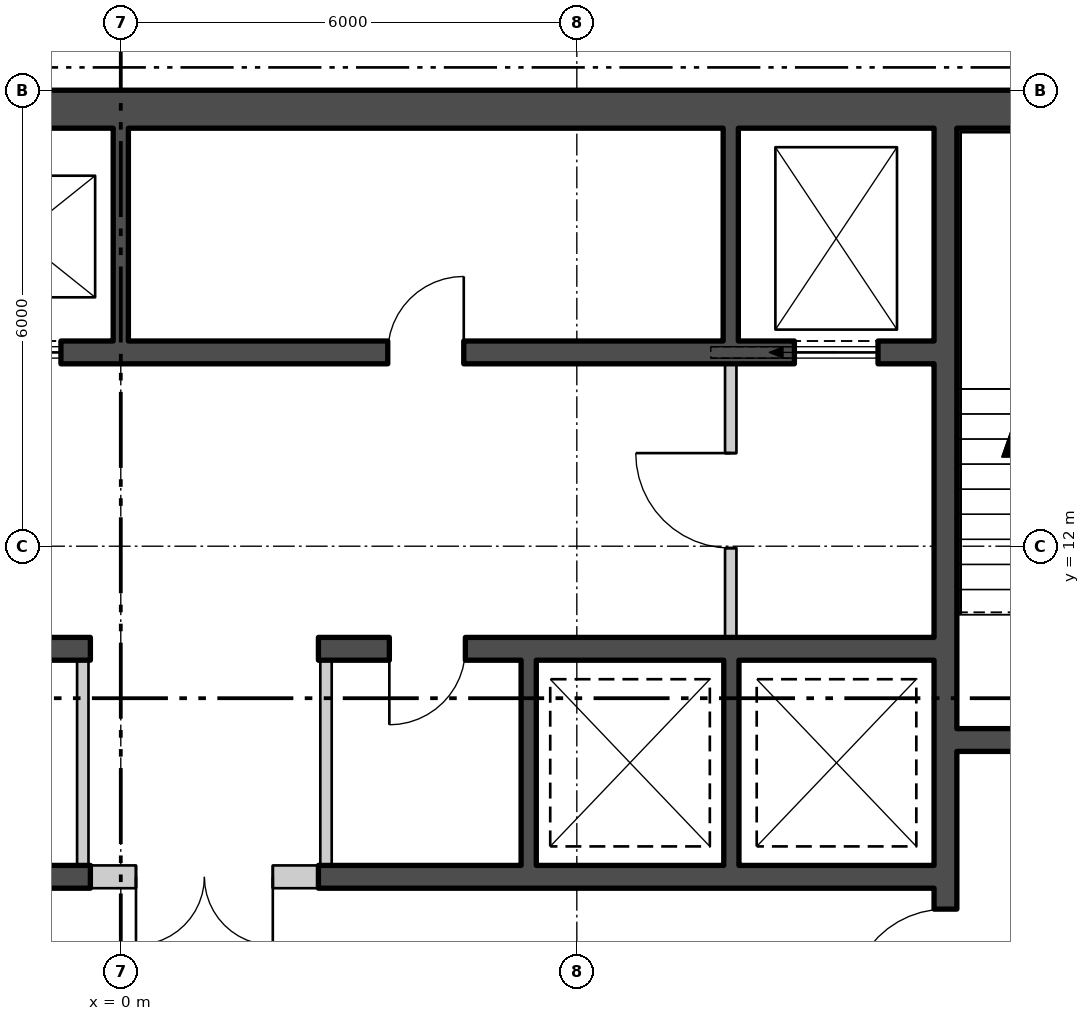
"""IFC4 building model, lengths in metres.
Left out: names, types, materials, properties, quantities, classifications, styles, units other than length and angle.
Written with IfcOpenShell. Run it as: python <this file> out.ifc"""

import sys

from ifc_helpers import new_model, si_unit, direction, frame, frame_2d, origin, place, context, subcontext, project, spatial, polyline, rectangle, outline, extrude, element, fill, save


model = new_model("IFC4")
c1 = context("Model", 3, precision=1e-05, world=origin(), true_north=direction((0.0, 1.0)))
c2 = subcontext(c1, "Body", "Model", "MODEL_VIEW")
j1 = project(units=[si_unit("LENGTHUNIT", "METRE"), si_unit("PLANEANGLEUNIT", "RADIAN")], contexts=[c1])
p1 = place(None, origin())
s1 = spatial("IfcSite", under=j1, at=p1, CompositionType="ELEMENT")
p2 = place(p1, origin())
s2 = spatial("IfcBuilding", under=s1, at=p2, CompositionType="ELEMENT")
p3 = place(p2, frame((0.0, 0.0, 186.6)))
s3 = spatial("IfcBuildingStorey", under=s2, at=p3, CompositionType="ELEMENT", Elevation=186.6)
p4 = place(p3, frame((3.8, -26.219, -0.18), z_axis=(0.0, 0.0, 1.0), x_axis=(0.500000711659, 0.866024992908, 0.0)))
e1 = element("IfcWall", 1, at=p4, inside=s3, PredefinedType="SOLIDWALL", context=c2, shape_type="SweptSolid", body=[
    extrude(outline(polyline([(-0.13, -0.225), (45.87, -0.225), (45.61, 0.225), (0.13, 0.225), (-0.13, -0.225)])), origin(), (0.0, 0.0, 1.0), 6.0),
])
p5 = place(p4, frame((1.424, 0.0, 1.38)))
e2 = element("IfcOpeningElement", 2, at=p5, cuts=e1, PredefinedType="OPENING", context=c2, shape_type="SweptSolid", body=[
    extrude(rectangle(XDim=2.4, YDim=3.6, at=frame_2d((1.2, 1.8))), frame((0.0, 0.235, 0.0), z_axis=(0.0, -1.0, 0.0), x_axis=(1.0, 0.0, 0.0)), (0.0, 0.0, 1.0), 0.47),
])
p6 = place(p4, frame((5.893, 0.0, 1.38)))
e3 = element("IfcOpeningElement", 3, at=p6, cuts=e1, PredefinedType="OPENING", context=c2, shape_type="SweptSolid", body=[
    extrude(rectangle(XDim=2.4, YDim=3.6, at=frame_2d((1.2, 1.8))), frame((0.0, 0.235, 0.0), z_axis=(0.0, -1.0, 0.0), x_axis=(1.0, 0.0, 0.0)), (0.0, 0.0, 1.0), 0.47),
])
p7 = place(p4, frame((10.401, 0.0, 1.38)))
e4 = element("IfcOpeningElement", 4, at=p7, cuts=e1, PredefinedType="OPENING", context=c2, shape_type="SweptSolid", body=[
    extrude(rectangle(XDim=2.4, YDim=3.6, at=frame_2d((1.2, 1.8))), frame((0.0, 0.235, 0.0), z_axis=(0.0, -1.0, 0.0), x_axis=(1.0, 0.0, 0.0)), (0.0, 0.0, 1.0), 0.47),
])
p8 = place(p4, frame((14.909, 0.0, 1.38)))
e5 = element("IfcOpeningElement", 5, at=p8, cuts=e1, PredefinedType="OPENING", context=c2, shape_type="SweptSolid", body=[
    extrude(rectangle(XDim=2.4, YDim=3.6, at=frame_2d((1.2, 1.8))), frame((0.0, 0.235, 0.0), z_axis=(0.0, -1.0, 0.0), x_axis=(1.0, 0.0, 0.0)), (0.0, 0.0, 1.0), 0.47),
])
p9 = place(p4, frame((19.416, 0.0, 1.38)))
e6 = element("IfcOpeningElement", 6, at=p9, cuts=e1, PredefinedType="OPENING", context=c2, shape_type="SweptSolid", body=[
    extrude(rectangle(XDim=2.4, YDim=3.6, at=frame_2d((1.2, 1.8))), frame((0.0, 0.235, 0.0), z_axis=(0.0, -1.0, 0.0), x_axis=(1.0, 0.0, 0.0)), (0.0, 0.0, 1.0), 0.47),
])
p10 = place(p4, frame((23.924, 0.0, 1.38)))
e7 = element("IfcOpeningElement", 7, at=p10, cuts=e1, PredefinedType="OPENING", context=c2, shape_type="SweptSolid", body=[
    extrude(rectangle(XDim=2.4, YDim=3.6, at=frame_2d((1.2, 1.8))), frame((0.0, 0.235, 0.0), z_axis=(0.0, -1.0, 0.0), x_axis=(1.0, 0.0, 0.0)), (0.0, 0.0, 1.0), 0.47),
])
p11 = place(p4, frame((28.431, 0.0, 1.38)))
e8 = element("IfcOpeningElement", 8, at=p11, cuts=e1, PredefinedType="OPENING", context=c2, shape_type="SweptSolid", body=[
    extrude(rectangle(XDim=2.4, YDim=3.6, at=frame_2d((1.2, 1.8))), frame((0.0, 0.235, 0.0), z_axis=(0.0, -1.0, 0.0), x_axis=(1.0, 0.0, 0.0)), (0.0, 0.0, 1.0), 0.47),
])
p12 = place(p4, frame((32.939, 0.0, 1.38)))
e9 = element("IfcOpeningElement", 9, at=p12, cuts=e1, PredefinedType="OPENING", context=c2, shape_type="SweptSolid", body=[
    extrude(rectangle(XDim=2.4, YDim=3.6, at=frame_2d((1.2, 1.8))), frame((0.0, 0.235, 0.0), z_axis=(0.0, -1.0, 0.0), x_axis=(1.0, 0.0, 0.0)), (0.0, 0.0, 1.0), 0.47),
])
p13 = place(p4, frame((37.447, 0.0, 1.38)))
e10 = element("IfcOpeningElement", 10, at=p13, cuts=e1, PredefinedType="OPENING", context=c2, shape_type="SweptSolid", body=[
    extrude(rectangle(XDim=2.4, YDim=3.6, at=frame_2d((1.2, 1.8))), frame((0.0, 0.235, 0.0), z_axis=(0.0, -1.0, 0.0), x_axis=(1.0, 0.0, 0.0)), (0.0, 0.0, 1.0), 0.47),
])
p14 = place(p4, frame((41.916, 0.0, 1.38)))
e11 = element("IfcOpeningElement", 11, at=p14, cuts=e1, PredefinedType="OPENING", context=c2, shape_type="SweptSolid", body=[
    extrude(rectangle(XDim=2.4, YDim=3.6, at=frame_2d((1.2, 1.8))), frame((0.0, 0.235, 0.0), z_axis=(0.0, -1.0, 0.0), x_axis=(1.0, 0.0, 0.0)), (0.0, 0.0, 1.0), 0.47),
])
p15 = place(p3, frame((-16.2, 17.75, 0.0), z_axis=(0.0, 0.0, 1.0), x_axis=(1.0, 0.0, 0.0)))
e12 = element("IfcWall", 12, at=p15, inside=s3, PredefinedType="SHEAR", context=c2, shape_type="SweptSolid", body=[
    extrude(rectangle(XDim=32.4, YDim=0.5, at=frame_2d((16.2, 0.0))), origin(), (0.0, 0.0, 1.0), 5.8),
])
p16 = place(p3, frame((10.85, 2.5, 0.0), z_axis=(0.0, 0.0, 1.0), x_axis=(0.0, 1.0, 0.0)))
e13 = element("IfcWall", 13, at=p16, inside=s3, PredefinedType="SHEAR", context=c2, shape_type="SweptSolid", body=[
    extrude(rectangle(XDim=15.0, YDim=0.3, at=frame_2d((7.5, 0.0))), origin(), (0.0, 0.0, 1.0), 5.8),
])
p17 = place(p16, frame((3.475, 0.0, 0.0)))
e14 = element("IfcOpeningElement", 14, at=p17, cuts=e13, PredefinedType="OPENING", context=c2, shape_type="SweptSolid", body=[
    extrude(rectangle(XDim=1.25, YDim=2.1, at=frame_2d((0.625, 1.05))), frame((0.0, 0.16, 0.0), z_axis=(0.0, -1.0, 0.0), x_axis=(1.0, 0.0, 0.0)), (0.0, 0.0, 1.0), 0.32),
])
p18 = place(p16, frame((1.125, 0.0, 0.0)))
e15 = element("IfcOpeningElement", 15, at=p18, cuts=e13, PredefinedType="OPENING", context=c2, shape_type="SweptSolid", body=[
    extrude(rectangle(XDim=1.0, YDim=2.1, at=frame_2d((0.5, 1.05))), frame((0.0, 0.16, 0.0), z_axis=(0.0, -1.0, 0.0), x_axis=(1.0, 0.0, 0.0)), (0.0, 0.0, 1.0), 0.32),
])
p19 = place(p3, frame((11.0, 9.45, 0.0), z_axis=(0.0, 0.0, 1.0), x_axis=(1.0, 0.0, 0.0)))
e16 = element("IfcWall", 16, at=p19, inside=s3, PredefinedType="SHEAR", context=c2, shape_type="SweptSolid", body=[
    extrude(rectangle(XDim=3.2, YDim=0.3, at=frame_2d((1.6, 0.0))), origin(), (0.0, 0.0, 1.0), 5.8),
])
p20 = place(p19, frame((1.0, 0.0, 0.0)))
e17 = element("IfcOpeningElement", 17, at=p20, cuts=e16, PredefinedType="OPENING", context=c2, shape_type="SweptSolid", body=[
    extrude(rectangle(XDim=1.2, YDim=2.1, at=frame_2d((0.6, 1.05))), frame((0.0, 0.16, 0.0), z_axis=(0.0, -1.0, 0.0), x_axis=(1.0, 0.0, 0.0)), (0.0, 0.0, 1.0), 0.32),
])
p21 = place(p3, frame((-10.7, 14.55, 0.0), z_axis=(0.0, 0.0, 1.0), x_axis=(1.0, 0.0, 0.0)))
e18 = element("IfcWall", 18, at=p21, inside=s3, PredefinedType="SHEAR", context=c2, shape_type="SweptSolid", body=[
    extrude(rectangle(XDim=21.4, YDim=0.3, at=frame_2d((10.7, 0.0))), origin(), (0.0, 0.0, 1.0), 5.8),
])
p22 = place(p21, frame((0.738, 0.0, 0.0)))
e19 = element("IfcOpeningElement", 19, at=p22, cuts=e18, PredefinedType="OPENING", context=c2, shape_type="SweptSolid", body=[
    extrude(rectangle(XDim=1.1, YDim=2.1, at=frame_2d((0.55, 1.05))), frame((0.0, 0.16, 0.0), z_axis=(0.0, -1.0, 0.0), x_axis=(1.0, 0.0, 0.0)), (0.0, 0.0, 1.0), 0.32),
])
p23 = place(p21, frame((3.462, 0.0, 0.0)))
e20 = element("IfcOpeningElement", 20, at=p23, cuts=e18, PredefinedType="OPENING", context=c2, shape_type="SweptSolid", body=[
    extrude(rectangle(XDim=1.1, YDim=2.1, at=frame_2d((0.55, 1.05))), frame((0.0, 0.16, 0.0), z_axis=(0.0, -1.0, 0.0), x_axis=(1.0, 0.0, 0.0)), (0.0, 0.0, 1.0), 0.32),
])
p24 = place(p21, frame((6.138, 0.0, 0.0)))
e21 = element("IfcOpeningElement", 21, at=p24, cuts=e18, PredefinedType="OPENING", context=c2, shape_type="SweptSolid", body=[
    extrude(rectangle(XDim=1.1, YDim=2.1, at=frame_2d((0.55, 1.05))), frame((0.0, 0.16, 0.0), z_axis=(0.0, -1.0, 0.0), x_axis=(1.0, 0.0, 0.0)), (0.0, 0.0, 1.0), 0.32),
])
p25 = place(p21, frame((8.812, 0.0, 0.0)))
e22 = element("IfcOpeningElement", 22, at=p25, cuts=e18, PredefinedType="OPENING", context=c2, shape_type="SweptSolid", body=[
    extrude(rectangle(XDim=1.1, YDim=2.1, at=frame_2d((0.55, 1.05))), frame((0.0, 0.16, 0.0), z_axis=(0.0, -1.0, 0.0), x_axis=(1.0, 0.0, 0.0)), (0.0, 0.0, 1.0), 0.32),
])
p26 = place(p21, frame((19.562, 0.0, 0.0)))
e23 = element("IfcOpeningElement", 23, at=p26, cuts=e18, PredefinedType="OPENING", context=c2, shape_type="SweptSolid", body=[
    extrude(rectangle(XDim=1.1, YDim=2.1, at=frame_2d((0.55, 1.05))), frame((0.0, 0.16, 0.0), z_axis=(0.0, -1.0, 0.0), x_axis=(1.0, 0.0, 0.0)), (0.0, 0.0, 1.0), 0.32),
])
p27 = place(p21, frame((14.213, 0.0, 0.0)))
e24 = element("IfcOpeningElement", 24, at=p27, cuts=e18, PredefinedType="OPENING", context=c2, shape_type="SweptSolid", body=[
    extrude(rectangle(XDim=1.0, YDim=2.1, at=frame_2d((0.5, 1.05))), frame((0.0, 0.16, 0.0), z_axis=(0.0, -1.0, 0.0), x_axis=(1.0, 0.0, 0.0)), (0.0, 0.0, 1.0), 0.32),
])
p28 = place(p3, frame((-10.7, 10.65, 0.0), z_axis=(0.0, 0.0, 1.0), x_axis=(1.0, 0.0, 0.0)))
e25 = element("IfcWall", 25, at=p28, inside=s3, PredefinedType="SHEAR", context=c2, shape_type="SweptSolid", body=[
    extrude(rectangle(XDim=10.3, YDim=0.3, at=frame_2d((5.15, 0.0))), origin(), (0.0, 0.0, 1.0), 5.8),
])
p29 = place(p28, frame((0.675, 0.0, 0.0)))
e26 = element("IfcOpeningElement", 26, at=p29, cuts=e25, PredefinedType="OPENING", context=c2, shape_type="SweptSolid", body=[
    extrude(rectangle(XDim=1.1, YDim=2.1, at=frame_2d((0.55, 1.05))), frame((0.0, 0.16, 0.0), z_axis=(0.0, -1.0, 0.0), x_axis=(1.0, 0.0, 0.0)), (0.0, 0.0, 1.0), 0.32),
])
p30 = place(p28, frame((3.275, 0.0, 0.0)))
e27 = element("IfcOpeningElement", 27, at=p30, cuts=e25, PredefinedType="OPENING", context=c2, shape_type="SweptSolid", body=[
    extrude(rectangle(XDim=1.1, YDim=2.1, at=frame_2d((0.55, 1.05))), frame((0.0, 0.16, 0.0), z_axis=(0.0, -1.0, 0.0), x_axis=(1.0, 0.0, 0.0)), (0.0, 0.0, 1.0), 0.32),
])
p31 = place(p28, frame((5.825, 0.0, 0.0)))
e28 = element("IfcOpeningElement", 28, at=p31, cuts=e25, PredefinedType="OPENING", context=c2, shape_type="SweptSolid", body=[
    extrude(rectangle(XDim=1.1, YDim=2.1, at=frame_2d((0.55, 1.05))), frame((0.0, 0.16, 0.0), z_axis=(0.0, -1.0, 0.0), x_axis=(1.0, 0.0, 0.0)), (0.0, 0.0, 1.0), 0.32),
])
p32 = place(p28, frame((8.425, 0.0, 0.0)))
e29 = element("IfcOpeningElement", 29, at=p32, cuts=e25, PredefinedType="OPENING", context=c2, shape_type="SweptSolid", body=[
    extrude(rectangle(XDim=1.0, YDim=2.1, at=frame_2d((0.5, 1.05))), frame((0.0, 0.16, 0.0), z_axis=(0.0, -1.0, 0.0), x_axis=(1.0, 0.0, 0.0)), (0.0, 0.0, 1.0), 0.32),
])
p33 = place(p3, frame((-10.7, 7.65, 0.0), z_axis=(0.0, 0.0, 1.0), x_axis=(1.0, 0.0, 0.0)))
e30 = element("IfcWall", 30, at=p33, inside=s3, PredefinedType="SHEAR", context=c2, shape_type="SweptSolid", body=[
    extrude(rectangle(XDim=10.3, YDim=0.3, at=frame_2d((5.15, 0.0))), origin(), (0.0, 0.0, 1.0), 5.8),
])
p34 = place(p3, frame((2.6, 10.65, 0.0), z_axis=(0.0, 0.0, 1.0), x_axis=(1.0, 0.0, 0.0)))
e31 = element("IfcWall", 31, at=p34, inside=s3, PredefinedType="SHEAR", context=c2, shape_type="SweptSolid", body=[
    extrude(rectangle(XDim=8.1, YDim=0.3, at=frame_2d((4.05, 0.0))), origin(), (0.0, 0.0, 1.0), 5.8),
])
p35 = place(p34, frame((0.933, 0.0, 0.0)))
e32 = element("IfcOpeningElement", 32, at=p35, cuts=e31, PredefinedType="OPENING", context=c2, shape_type="SweptSolid", body=[
    extrude(rectangle(XDim=1.0, YDim=2.1, at=frame_2d((0.5, 1.05))), frame((0.0, 0.16, 0.0), z_axis=(0.0, -1.0, 0.0), x_axis=(1.0, 0.0, 0.0)), (0.0, 0.0, 1.0), 0.32),
])
p36 = place(p3, frame((2.6, 7.65, 0.0), z_axis=(0.0, 0.0, 1.0), x_axis=(1.0, 0.0, 0.0)))
e33 = element("IfcWall", 33, at=p36, inside=s3, PredefinedType="SHEAR", context=c2, shape_type="SweptSolid", body=[
    extrude(rectangle(XDim=8.1, YDim=0.3, at=frame_2d((4.05, 0.0))), origin(), (0.0, 0.0, 1.0), 5.8),
])
for number, where, z_axis, x_axis in (
    (34, (0.0, 14.7, 0.0), (0.0, 0.0, 1.0), (0.0, 1.0, 0.0)),
    (35, (8.025, 14.7, 0.0), (0.0, 0.0, 1.0), (0.0, 1.0, 0.0)),
):
    element("IfcWall", number, at=place(p3, frame(where, z_axis=z_axis, x_axis=x_axis)), inside=s3, PredefinedType="SHEAR", context=c2, shape_type="SweptSolid", body=[
        extrude(rectangle(XDim=2.8, YDim=0.2, at=frame_2d((1.4, 0.0))), origin(), (0.0, 0.0, 1.0), 5.8),
    ])
for number, where, z_axis, x_axis in (
    (36, (-0.5, 7.8, 0.0), (0.0, 0.0, 1.0), (0.0, 1.0, 0.0)),
    (37, (2.7, 7.8, 0.0), (0.0, 0.0, 1.0), (0.0, 1.0, 0.0)),
):
    element("IfcWall", number, at=place(p3, frame(where, z_axis=z_axis, x_axis=x_axis)), inside=s3, PredefinedType="PARTITIONING", context=c2, shape_type="SweptSolid", body=[
        extrude(rectangle(XDim=2.7, YDim=0.15, at=frame_2d((1.35, 0.0))), origin(), (0.0, 0.0, 1.0), 5.8),
    ])
for number, where, z_axis, x_axis in (
    (38, (5.367, 7.8, 0.0), (0.0, 0.0, 1.0), (0.0, 1.0, 0.0)),
    (39, (8.033, 7.8, 0.0), (0.0, 0.0, 1.0), (0.0, 1.0, 0.0)),
):
    element("IfcWall", number, at=place(p3, frame(where, z_axis=z_axis, x_axis=x_axis)), inside=s3, PredefinedType="SHEAR", context=c2, shape_type="SweptSolid", body=[
        extrude(rectangle(XDim=2.7, YDim=0.2, at=frame_2d((1.35, 0.0))), origin(), (0.0, 0.0, 1.0), 5.8),
    ])
p37 = place(p3, frame((8.025, 10.8, 0.0), z_axis=(0.0, 0.0, 1.0), x_axis=(0.0, 1.0, 0.0)))
e40 = element("IfcWall", 40, at=p37, inside=s3, PredefinedType="PARTITIONING", context=c2, shape_type="SweptSolid", body=[
    extrude(rectangle(XDim=3.6, YDim=0.15, at=frame_2d((1.8, 0.0))), origin(), (0.0, 0.0, 1.0), 5.8),
])
p38 = place(p37, frame((1.175, 0.0, 0.0)))
e41 = element("IfcOpeningElement", 41, at=p38, cuts=e40, PredefinedType="OPENING", context=c2, shape_type="SweptSolid", body=[
    extrude(rectangle(XDim=1.25, YDim=2.1, at=frame_2d((0.625, 1.05))), frame((0.0, 0.085, 0.0), z_axis=(0.0, -1.0, 0.0), x_axis=(1.0, 0.0, 0.0)), (0.0, 0.0, 1.0), 0.17),
])
p39 = place(p3, frame((-0.4, 7.65, 0.0), z_axis=(0.0, 0.0, 1.0), x_axis=(1.0, 0.0, 0.0)))
e42 = element("IfcWall", 42, at=p39, inside=s3, PredefinedType="PARTITIONING", context=c2, shape_type="SweptSolid", body=[
    extrude(rectangle(XDim=3.0, YDim=0.3, at=frame_2d((1.5, 0.0))), origin(), (0.0, 0.0, 1.0), 5.8),
])
p40 = place(p39, frame((0.6, 0.0, 0.0)))
e43 = element("IfcOpeningElement", 43, at=p40, cuts=e42, PredefinedType="OPENING", context=c2, shape_type="SweptSolid", body=[
    extrude(rectangle(XDim=1.8, YDim=2.4, at=frame_2d((0.9, 1.2))), frame((0.0, 0.16, 0.0), z_axis=(0.0, -1.0, 0.0), x_axis=(1.0, 0.0, 0.0)), (0.0, 0.0, 1.0), 0.32),
])
p41 = place(p25, origin())
e44 = element("IfcDoor", 44, at=p41, inside=s3, OperationType="SLIDING_TO_LEFT", PredefinedType="DOOR", context=c2, shape_type="SweptSolid", body=[
    extrude(rectangle(XDim=1.1, YDim=2.1, at=frame_2d((0.55, 1.05))), frame((0.0, 0.025, 0.0), z_axis=(0.0, -1.0, 0.0), x_axis=(1.0, 0.0, 0.0)), (0.0, 0.0, 1.0), 0.05),
])
fill(e22, e44)
p42 = place(p26, origin())
e45 = element("IfcDoor", 45, at=p42, inside=s3, OperationType="SLIDING_TO_LEFT", PredefinedType="DOOR", context=c2, shape_type="SweptSolid", body=[
    extrude(rectangle(XDim=1.1, YDim=2.1, at=frame_2d((0.55, 1.05))), frame((0.0, 0.025, 0.0), z_axis=(0.0, -1.0, 0.0), x_axis=(1.0, 0.0, 0.0)), (0.0, 0.0, 1.0), 0.05),
])
fill(e23, e45)
p43 = place(p27, origin())
e46 = element("IfcDoor", 46, at=p43, inside=s3, OperationType="SINGLE_SWING_LEFT", PredefinedType="DOOR", context=c2, shape_type="SweptSolid", body=[
    extrude(rectangle(XDim=1.0, YDim=2.1, at=frame_2d((0.5, 1.05))), frame((0.0, 0.025, 0.0), z_axis=(0.0, -1.0, 0.0), x_axis=(1.0, 0.0, 0.0)), (0.0, 0.0, 1.0), 0.05),
])
fill(e24, e46)
p44 = place(p35, origin())
e47 = element("IfcDoor", 47, at=p44, inside=s3, OperationType="SINGLE_SWING_LEFT", PredefinedType="DOOR", context=c2, shape_type="SweptSolid", body=[
    extrude(rectangle(XDim=1.0, YDim=2.1, at=frame_2d((0.5, 1.05))), frame((0.0, 0.025, 0.0), z_axis=(0.0, -1.0, 0.0), x_axis=(1.0, 0.0, 0.0)), (0.0, 0.0, 1.0), 0.05),
])
fill(e32, e47)
p45 = place(p38, origin())
e48 = element("IfcDoor", 48, at=p45, inside=s3, OperationType="SINGLE_SWING_LEFT", PredefinedType="DOOR", context=c2, shape_type="SweptSolid", body=[
    extrude(rectangle(XDim=1.25, YDim=2.1, at=frame_2d((0.625, 1.05))), frame((0.0, 0.025, 0.0), z_axis=(0.0, -1.0, 0.0), x_axis=(1.0, 0.0, 0.0)), (0.0, 0.0, 1.0), 0.05),
])
fill(e41, e48)
p46 = place(p17, origin())
e49 = element("IfcDoor", 49, at=p46, inside=s3, OperationType="SINGLE_SWING_RIGHT", PredefinedType="DOOR", context=c2, shape_type="SweptSolid", body=[
    extrude(rectangle(XDim=1.25, YDim=2.1, at=frame_2d((0.625, 1.05))), frame((0.0, 0.025, 0.0), z_axis=(0.0, -1.0, 0.0), x_axis=(1.0, 0.0, 0.0)), (0.0, 0.0, 1.0), 0.05),
])
fill(e14, e49)
p47 = place(p40, origin())
e50 = element("IfcDoor", 50, at=p47, inside=s3, OperationType="DOUBLE_DOOR_SINGLE_SWING", PredefinedType="DOOR", context=c2, shape_type="SweptSolid", body=[
    extrude(rectangle(XDim=1.8, YDim=2.4, at=frame_2d((0.9, 1.2))), frame((0.0, 0.025, 0.0), z_axis=(0.0, -1.0, 0.0), x_axis=(1.0, 0.0, 0.0)), (0.0, 0.0, 1.0), 0.05),
])
fill(e43, e50)
save(model, sys.argv[1])
